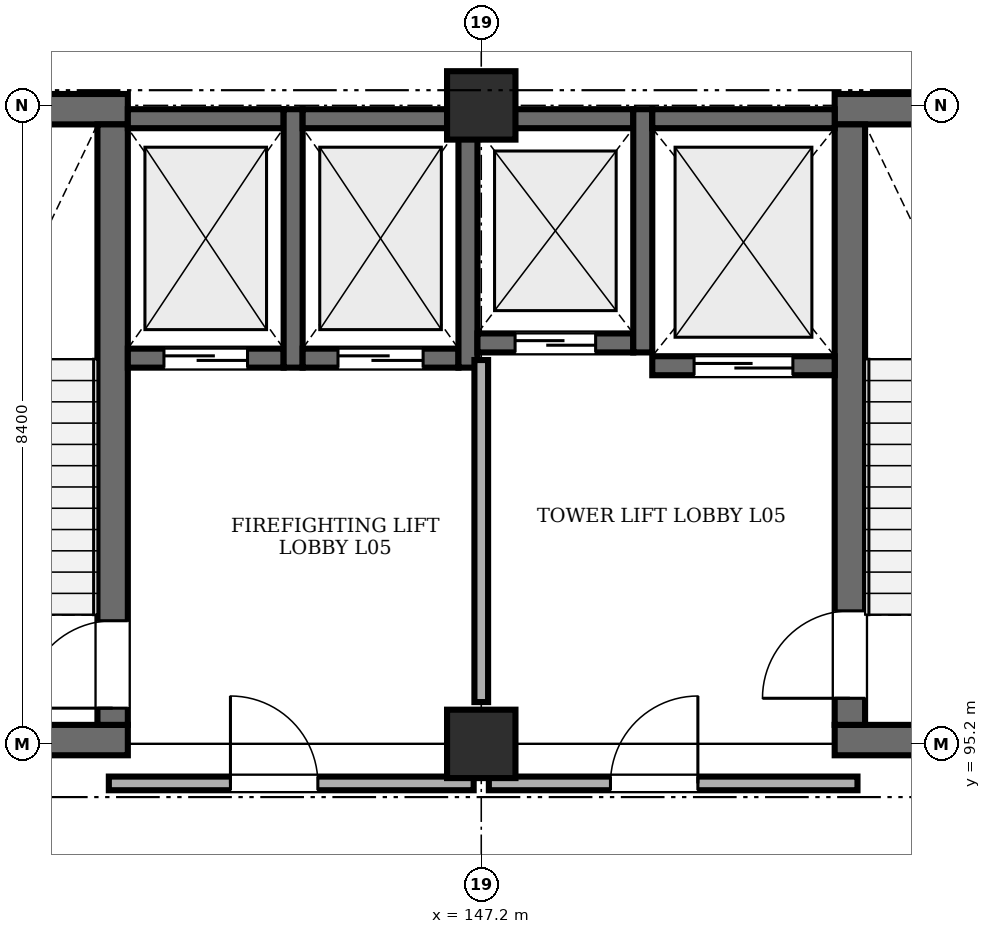
"""IFC4 building model, lengths in metres.
Left out: names, types, materials, properties, quantities, classifications, styles, units other than length and angle.
Written with IfcOpenShell. Run it as: python <this file> out.ifc"""

import sys

from ifc_helpers import new_model, si_unit, direction, frame, frame_2d, origin, origin_2d, place, context, subcontext, project, spatial, rectangle, extrude, element, fill, save


model = new_model("IFC4")
c1 = context("Model", 3, precision=1e-05, world=origin(), true_north=direction((0.0, 1.0)))
c2 = subcontext(c1, "Body", "Model", "MODEL_VIEW")
j1 = project(units=[si_unit("LENGTHUNIT", "METRE"), si_unit("PLANEANGLEUNIT", "RADIAN")], contexts=[c1])
p1 = place(None, origin())
s1 = spatial("IfcSite", under=j1, at=p1, CompositionType="ELEMENT")
p2 = place(p1, origin())
s2 = spatial("IfcBuilding", under=s1, at=p2, CompositionType="ELEMENT")
p3 = place(p2, frame((0.0, 0.0, 19.2)))
s3 = spatial("IfcBuildingStorey", under=s2, at=p3, CompositionType="ELEMENT", Elevation=19.2)
for number, where, z_axis, x_axis in (
    (1, (147.2, 95.2, 0.0), (0.0, 0.0, 1.0), (1.0, 0.0, 0.0)),
    (2, (147.2, 103.6, 0.0), (0.0, 0.0, 1.0), (1.0, 0.0, 0.0)),
):
    element("IfcColumn", number, at=place(p3, frame(where, z_axis=z_axis, x_axis=x_axis)), inside=s3, PredefinedType="COLUMN", context=c2, shape_type="SweptSolid", body=[
        extrude(rectangle(XDim=0.9, YDim=0.9, at=origin_2d()), origin(), (0.0, 0.0, 1.0), 4.02),
    ])
for number, where, z_axis, x_axis in (
    (3, (138.65, 95.25, 0.0), (0.0, 0.0, 1.0), (1.0, 0.0, 0.0)),
    (4, (138.65, 103.55, 0.0), (0.0, 0.0, 1.0), (1.0, 0.0, 0.0)),
):
    element("IfcWall", number, at=place(p3, frame(where, z_axis=z_axis, x_axis=x_axis)), inside=s3, PredefinedType="SHEAR", context=c2, shape_type="SweptSolid", body=[
        extrude(rectangle(XDim=3.9, YDim=0.4, at=frame_2d((1.95, 0.0))), origin(), (0.0, 0.0, 1.0), 4.02),
    ])
p4 = place(p3, frame((142.35, 95.45, 0.0), z_axis=(0.0, 0.0, 1.0), x_axis=(0.0, 1.0, 0.0)))
e5 = element("IfcWall", 5, at=p4, inside=s3, PredefinedType="SHEAR", context=c2, shape_type="SweptSolid", body=[
    extrude(rectangle(XDim=7.9, YDim=0.4, at=frame_2d((3.95, 0.0))), origin(), (0.0, 0.0, 1.0), 4.02),
])
p5 = place(p4, frame((0.22, 0.0, 0.0)))
e6 = element("IfcOpeningElement", 6, at=p5, cuts=e5, PredefinedType="OPENING", context=c2, shape_type="SweptSolid", body=[
    extrude(rectangle(XDim=1.15, YDim=2.15, at=frame_2d((0.575, 1.075))), frame((0.0, 0.21, 0.0), z_axis=(0.0, -1.0, 0.0), x_axis=(1.0, 0.0, 0.0)), (0.0, 0.0, 1.0), 0.42),
])
for number, where, z_axis, x_axis in (
    (7, (151.85, 95.25, 0.0), (0.0, 0.0, 1.0), (1.0, 0.0, 0.0)),
    (8, (151.85, 103.55, 0.0), (0.0, 0.0, 1.0), (1.0, 0.0, 0.0)),
):
    element("IfcWall", number, at=place(p3, frame(where, z_axis=z_axis, x_axis=x_axis)), inside=s3, PredefinedType="SHEAR", context=c2, shape_type="SweptSolid", body=[
        extrude(rectangle(XDim=3.9, YDim=0.4, at=frame_2d((1.95, 0.0))), origin(), (0.0, 0.0, 1.0), 4.02),
    ])
p6 = place(p3, frame((152.05, 95.45, 0.0), z_axis=(0.0, 0.0, 1.0), x_axis=(0.0, 1.0, 0.0)))
e9 = element("IfcWall", 9, at=p6, inside=s3, PredefinedType="SHEAR", context=c2, shape_type="SweptSolid", body=[
    extrude(rectangle(XDim=7.9, YDim=0.4, at=frame_2d((3.95, 0.0))), origin(), (0.0, 0.0, 1.0), 4.02),
])
p7 = place(p6, frame((0.35, 0.0, 0.0)))
e10 = element("IfcOpeningElement", 10, at=p7, cuts=e9, PredefinedType="OPENING", context=c2, shape_type="SweptSolid", body=[
    extrude(rectangle(XDim=1.15, YDim=2.15, at=frame_2d((0.575, 1.075))), frame((0.0, 0.21, 0.0), z_axis=(0.0, -1.0, 0.0), x_axis=(1.0, 0.0, 0.0)), (0.0, 0.0, 1.0), 0.42),
])
p8 = place(p3, frame((142.55, 100.275, 0.0), z_axis=(0.0, 0.0, 1.0), x_axis=(1.0, 0.0, 0.0)))
e11 = element("IfcWall", 11, at=p8, inside=s3, PredefinedType="SHEAR", context=c2, shape_type="SweptSolid", body=[
    extrude(rectangle(XDim=2.05, YDim=0.25, at=frame_2d((1.025, 0.0))), origin(), (0.0, 0.0, 1.0), 4.02),
])
p9 = place(p8, frame((0.475, 0.0, 0.0)))
e12 = element("IfcOpeningElement", 12, at=p9, cuts=e11, PredefinedType="OPENING", context=c2, shape_type="SweptSolid", body=[
    extrude(rectangle(XDim=1.1, YDim=2.15, at=frame_2d((0.55, 1.075))), frame((0.0, 0.135, 0.0), z_axis=(0.0, -1.0, 0.0), x_axis=(1.0, 0.0, 0.0)), (0.0, 0.0, 1.0), 0.27),
])
p10 = place(p3, frame((142.55, 103.425, 0.0), z_axis=(0.0, 0.0, 1.0), x_axis=(1.0, 0.0, 0.0)))
e13 = element("IfcWall", 13, at=p10, inside=s3, PredefinedType="SHEAR", context=c2, shape_type="SweptSolid", body=[
    extrude(rectangle(XDim=2.05, YDim=0.25, at=frame_2d((1.025, 0.0))), origin(), (0.0, 0.0, 1.0), 4.02),
])
p11 = place(p3, frame((144.725, 100.15, 0.0), z_axis=(0.0, 0.0, 1.0), x_axis=(0.0, 1.0, 0.0)))
e14 = element("IfcWall", 14, at=p11, inside=s3, PredefinedType="SHEAR", context=c2, shape_type="SweptSolid", body=[
    extrude(rectangle(XDim=3.4, YDim=0.25, at=frame_2d((1.7, 0.0))), origin(), (0.0, 0.0, 1.0), 4.02),
])
p12 = place(p3, frame((144.85, 100.275, 0.0), z_axis=(0.0, 0.0, 1.0), x_axis=(1.0, 0.0, 0.0)))
e15 = element("IfcWall", 15, at=p12, inside=s3, PredefinedType="SHEAR", context=c2, shape_type="SweptSolid", body=[
    extrude(rectangle(XDim=2.05, YDim=0.25, at=frame_2d((1.025, 0.0))), origin(), (0.0, 0.0, 1.0), 4.02),
])
p13 = place(p12, frame((0.465, 0.0, 0.0)))
e16 = element("IfcOpeningElement", 16, at=p13, cuts=e15, PredefinedType="OPENING", context=c2, shape_type="SweptSolid", body=[
    extrude(rectangle(XDim=1.12, YDim=2.15, at=frame_2d((0.56, 1.075))), frame((0.0, 0.135, 0.0), z_axis=(0.0, -1.0, 0.0), x_axis=(1.0, 0.0, 0.0)), (0.0, 0.0, 1.0), 0.27),
])
p14 = place(p3, frame((144.85, 103.425, 0.0), z_axis=(0.0, 0.0, 1.0), x_axis=(1.0, 0.0, 0.0)))
e17 = element("IfcWall", 17, at=p14, inside=s3, PredefinedType="SHEAR", context=c2, shape_type="SweptSolid", body=[
    extrude(rectangle(XDim=2.05, YDim=0.25, at=frame_2d((1.025, 0.0))), origin(), (0.0, 0.0, 1.0), 4.02),
])
p15 = place(p3, frame((147.025, 100.15, 0.0), z_axis=(0.0, 0.0, 1.0), x_axis=(0.0, 1.0, 0.0)))
e18 = element("IfcWall", 18, at=p15, inside=s3, PredefinedType="SHEAR", context=c2, shape_type="SweptSolid", body=[
    extrude(rectangle(XDim=3.4, YDim=0.25, at=frame_2d((1.7, 0.0))), origin(), (0.0, 0.0, 1.0), 4.02),
])
p16 = place(p3, frame((147.15, 100.475, 0.0), z_axis=(0.0, 0.0, 1.0), x_axis=(1.0, 0.0, 0.0)))
e19 = element("IfcWall", 19, at=p16, inside=s3, PredefinedType="SHEAR", context=c2, shape_type="SweptSolid", body=[
    extrude(rectangle(XDim=2.05, YDim=0.25, at=frame_2d((1.025, 0.0))), origin(), (0.0, 0.0, 1.0), 4.02),
])
p17 = place(p16, frame((0.495, 0.0, 0.0)))
e20 = element("IfcOpeningElement", 20, at=p17, cuts=e19, PredefinedType="OPENING", context=c2, shape_type="SweptSolid", body=[
    extrude(rectangle(XDim=1.06, YDim=2.15, at=frame_2d((0.53, 1.075))), frame((0.0, 0.135, 0.0), z_axis=(0.0, -1.0, 0.0), x_axis=(1.0, 0.0, 0.0)), (0.0, 0.0, 1.0), 0.27),
])
p18 = place(p3, frame((147.15, 103.425, 0.0), z_axis=(0.0, 0.0, 1.0), x_axis=(1.0, 0.0, 0.0)))
e21 = element("IfcWall", 21, at=p18, inside=s3, PredefinedType="SHEAR", context=c2, shape_type="SweptSolid", body=[
    extrude(rectangle(XDim=2.05, YDim=0.25, at=frame_2d((1.025, 0.0))), origin(), (0.0, 0.0, 1.0), 4.02),
])
p19 = place(p3, frame((149.325, 100.35, 0.0), z_axis=(0.0, 0.0, 1.0), x_axis=(0.0, 1.0, 0.0)))
e22 = element("IfcWall", 22, at=p19, inside=s3, PredefinedType="SHEAR", context=c2, shape_type="SweptSolid", body=[
    extrude(rectangle(XDim=3.2, YDim=0.25, at=frame_2d((1.6, 0.0))), origin(), (0.0, 0.0, 1.0), 4.02),
])
p20 = place(p3, frame((149.45, 100.175, 0.0), z_axis=(0.0, 0.0, 1.0), x_axis=(1.0, 0.0, 0.0)))
e23 = element("IfcWall", 23, at=p20, inside=s3, PredefinedType="SHEAR", context=c2, shape_type="SweptSolid", body=[
    extrude(rectangle(XDim=2.4, YDim=0.25, at=frame_2d((1.2, 0.0))), origin(), (0.0, 0.0, 1.0), 4.02),
])
p21 = place(p20, frame((0.55, 0.0, 0.0)))
e24 = element("IfcOpeningElement", 24, at=p21, cuts=e23, PredefinedType="OPENING", context=c2, shape_type="SweptSolid", body=[
    extrude(rectangle(XDim=1.3, YDim=2.25, at=frame_2d((0.65, 1.125))), frame((0.0, 0.135, 0.0), z_axis=(0.0, -1.0, 0.0), x_axis=(1.0, 0.0, 0.0)), (0.0, 0.0, 1.0), 0.27),
])
p22 = place(p3, frame((149.45, 103.425, 0.0), z_axis=(0.0, 0.0, 1.0), x_axis=(1.0, 0.0, 0.0)))
e25 = element("IfcWall", 25, at=p22, inside=s3, PredefinedType="SHEAR", context=c2, shape_type="SweptSolid", body=[
    extrude(rectangle(XDim=2.4, YDim=0.25, at=frame_2d((1.2, 0.0))), origin(), (0.0, 0.0, 1.0), 4.02),
])
p23 = place(p3, frame((142.3, 94.68, 0.0), z_axis=(0.0, 0.0, 1.0), x_axis=(1.0, 0.0, 0.0)))
e26 = element("IfcWall", 26, at=p23, inside=s3, PredefinedType="STANDARD", context=c2, shape_type="SweptSolid", body=[
    extrude(rectangle(XDim=4.8, YDim=0.18, at=frame_2d((2.4, 0.0))), origin(), (0.0, 0.0, 1.0), 4.02),
])
p24 = place(p23, frame((1.6, 0.0, 0.0)))
e27 = element("IfcOpeningElement", 27, at=p24, cuts=e26, PredefinedType="OPENING", context=c2, shape_type="SweptSolid", body=[
    extrude(rectangle(XDim=1.15, YDim=2.15, at=frame_2d((0.575, 1.075))), frame((0.0, 0.1, 0.0), z_axis=(0.0, -1.0, 0.0), x_axis=(1.0, 0.0, 0.0)), (0.0, 0.0, 1.0), 0.2),
])
p25 = place(p3, frame((147.3, 94.68, 0.0), z_axis=(0.0, 0.0, 1.0), x_axis=(1.0, 0.0, 0.0)))
e28 = element("IfcWall", 28, at=p25, inside=s3, PredefinedType="STANDARD", context=c2, shape_type="SweptSolid", body=[
    extrude(rectangle(XDim=4.85, YDim=0.18, at=frame_2d((2.425, 0.0))), origin(), (0.0, 0.0, 1.0), 4.02),
])
p26 = place(p25, frame((1.6, 0.0, 0.0)))
e29 = element("IfcOpeningElement", 29, at=p26, cuts=e28, PredefinedType="OPENING", context=c2, shape_type="SweptSolid", body=[
    extrude(rectangle(XDim=1.15, YDim=2.15, at=frame_2d((0.575, 1.075))), frame((0.0, 0.1, 0.0), z_axis=(0.0, -1.0, 0.0), x_axis=(1.0, 0.0, 0.0)), (0.0, 0.0, 1.0), 0.2),
])
p27 = place(p3, frame((147.2, 95.75, 0.0), z_axis=(0.0, 0.0, 1.0), x_axis=(0.0, 1.0, 0.0)))
e30 = element("IfcWall", 30, at=p27, inside=s3, PredefinedType="STANDARD", context=c2, shape_type="SweptSolid", body=[
    extrude(rectangle(XDim=4.5, YDim=0.18, at=frame_2d((2.25, 0.0))), origin(), (0.0, 0.0, 1.0), 3.32),
])
p28 = place(p24, origin())
e31 = element("IfcDoor", 31, at=p28, inside=s3, OperationType="SINGLE_SWING_LEFT", PredefinedType="DOOR", context=c2, shape_type="SweptSolid", body=[
    extrude(rectangle(XDim=1.15, YDim=2.15, at=frame_2d((0.575, 1.075))), frame((0.0, 0.025, 0.0), z_axis=(0.0, -1.0, 0.0), x_axis=(1.0, 0.0, 0.0)), (0.0, 0.0, 1.0), 0.05),
])
fill(e27, e31)
p29 = place(p26, origin())
e32 = element("IfcDoor", 32, at=p29, inside=s3, OperationType="SINGLE_SWING_RIGHT", PredefinedType="DOOR", context=c2, shape_type="SweptSolid", body=[
    extrude(rectangle(XDim=1.15, YDim=2.15, at=frame_2d((0.575, 1.075))), frame((0.0, 0.025, 0.0), z_axis=(0.0, -1.0, 0.0), x_axis=(1.0, 0.0, 0.0)), (0.0, 0.0, 1.0), 0.05),
])
fill(e29, e32)
p30 = place(p5, origin())
e33 = element("IfcDoor", 33, at=p30, inside=s3, OperationType="SINGLE_SWING_LEFT", PredefinedType="DOOR", context=c2, shape_type="SweptSolid", body=[
    extrude(rectangle(XDim=1.15, YDim=2.15, at=frame_2d((0.575, 1.075))), frame((0.0, 0.025, 0.0), z_axis=(0.0, -1.0, 0.0), x_axis=(1.0, 0.0, 0.0)), (0.0, 0.0, 1.0), 0.05),
])
fill(e6, e33)
p31 = place(p7, origin())
e34 = element("IfcDoor", 34, at=p31, inside=s3, OperationType="SINGLE_SWING_LEFT", PredefinedType="DOOR", context=c2, shape_type="SweptSolid", body=[
    extrude(rectangle(XDim=1.15, YDim=2.15, at=frame_2d((0.575, 1.075))), frame((0.0, 0.025, 0.0), z_axis=(0.0, -1.0, 0.0), x_axis=(1.0, 0.0, 0.0)), (0.0, 0.0, 1.0), 0.05),
])
fill(e10, e34)
p32 = place(p9, origin())
e35 = element("IfcDoor", 35, at=p32, inside=s3, OperationType="SLIDING_TO_LEFT", PredefinedType="DOOR", context=c2, shape_type="SweptSolid", body=[
    extrude(rectangle(XDim=1.1, YDim=2.15, at=frame_2d((0.55, 1.075))), frame((0.0, 0.025, 0.0), z_axis=(0.0, -1.0, 0.0), x_axis=(1.0, 0.0, 0.0)), (0.0, 0.0, 1.0), 0.05),
])
fill(e12, e35)
p33 = place(p13, origin())
e36 = element("IfcDoor", 36, at=p33, inside=s3, OperationType="SLIDING_TO_LEFT", PredefinedType="DOOR", context=c2, shape_type="SweptSolid", body=[
    extrude(rectangle(XDim=1.12, YDim=2.15, at=frame_2d((0.56, 1.075))), frame((0.0, 0.025, 0.0), z_axis=(0.0, -1.0, 0.0), x_axis=(1.0, 0.0, 0.0)), (0.0, 0.0, 1.0), 0.05),
])
fill(e16, e36)
p34 = place(p17, origin())
e37 = element("IfcDoor", 37, at=p34, inside=s3, OperationType="SLIDING_TO_LEFT", PredefinedType="DOOR", context=c2, shape_type="SweptSolid", body=[
    extrude(rectangle(XDim=1.06, YDim=2.15, at=frame_2d((0.53, 1.075))), frame((0.0, 0.025, 0.0), z_axis=(0.0, -1.0, 0.0), x_axis=(1.0, 0.0, 0.0)), (0.0, 0.0, 1.0), 0.05),
])
fill(e20, e37)
p35 = place(p21, origin())
e38 = element("IfcDoor", 38, at=p35, inside=s3, OperationType="SLIDING_TO_LEFT", PredefinedType="DOOR", context=c2, shape_type="SweptSolid", body=[
    extrude(rectangle(XDim=1.3, YDim=2.25, at=frame_2d((0.65, 1.125))), frame((0.0, 0.025, 0.0), z_axis=(0.0, -1.0, 0.0), x_axis=(1.0, 0.0, 0.0)), (0.0, 0.0, 1.0), 0.05),
])
fill(e24, e38)
save(model, sys.argv[1])
